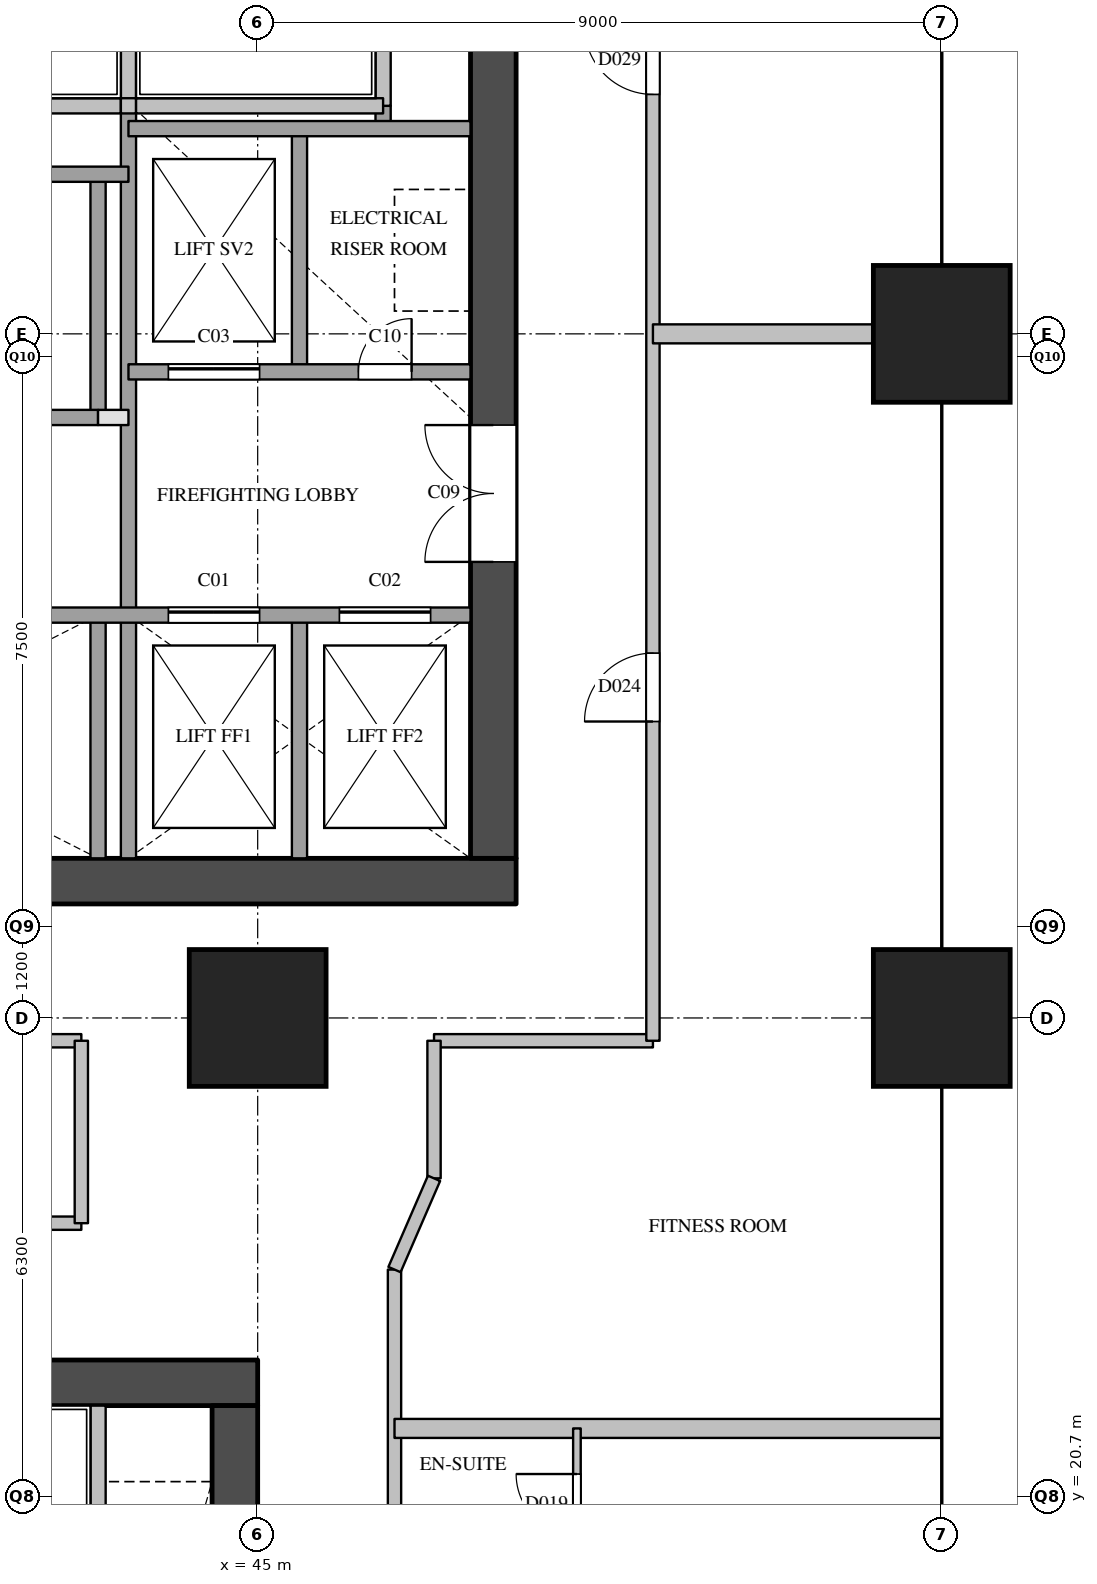
"""IFC4 building model, lengths in metres.
Left out: names, types, materials, properties, quantities, classifications, styles, units other than length and angle.
Written with IfcOpenShell. Run it as: python <this file> out.ifc"""

import sys

from ifc_helpers import new_model, si_unit, direction, frame, frame_2d, origin, origin_2d, place, context, subcontext, project, spatial, rectangle, extrude, element, fill, save


model = new_model("IFC4")
c1 = context("Model", 3, precision=1e-05, world=origin(), true_north=direction((0.0, 1.0)))
c2 = subcontext(c1, "Body", "Model", "MODEL_VIEW")
j1 = project(units=[si_unit("LENGTHUNIT", "METRE"), si_unit("PLANEANGLEUNIT", "RADIAN")], contexts=[c1])
p1 = place(None, origin())
s1 = spatial("IfcSite", under=j1, at=p1, CompositionType="ELEMENT")
p2 = place(p1, origin())
s2 = spatial("IfcBuilding", under=s1, at=p2, CompositionType="ELEMENT")
p3 = place(p2, frame((0.0, 0.0, 112.0)))
s3 = spatial("IfcBuildingStorey", under=s2, at=p3, CompositionType="ELEMENT", Elevation=112.0)
for number, where, z_axis, x_axis in (
    (1, (45.0, 27.0, 0.0), (0.0, 0.0, 1.0), (1.0, 0.0, 0.0)),
    (2, (54.0, 27.0, 0.0), (0.0, 0.0, 1.0), (1.0, 0.0, 0.0)),
    (3, (54.0, 36.0, 0.0), (0.0, 0.0, 1.0), (1.0, 0.0, 0.0)),
):
    element("IfcColumn", number, at=place(p3, frame(where, z_axis=z_axis, x_axis=x_axis)), inside=s3, PredefinedType="COLUMN", context=c2, shape_type="SweptSolid", body=[
        extrude(rectangle(XDim=1.8, YDim=1.8, at=origin_2d()), origin(), (0.0, 0.0, 1.0), 3.8),
    ])
p4 = place(p3, frame((36.0, 28.8, 0.0), z_axis=(0.0, 0.0, 1.0), x_axis=(1.0, 0.0, 0.0)))
e4 = element("IfcWall", 4, at=p4, inside=s3, PredefinedType="SHEAR", context=c2, shape_type="SweptSolid", body=[
    extrude(rectangle(XDim=12.4, YDim=0.6, at=frame_2d((6.2, 0.0))), origin(), (0.0, 0.0, 1.0), 3.5),
])
p5 = place(p3, frame((48.1, 29.1, 0.0), z_axis=(0.0, 0.0, 1.0), x_axis=(0.0, 1.0, 0.0)))
e5 = element("IfcWall", 5, at=p5, inside=s3, PredefinedType="SHEAR", context=c2, shape_type="SweptSolid", body=[
    extrude(rectangle(XDim=20.3, YDim=0.6, at=frame_2d((10.15, 0.0))), origin(), (0.0, 0.0, 1.0), 3.5),
])
p6 = place(p5, frame((12.5, 0.0, 0.0)))
e6 = element("IfcOpeningElement", 6, at=p6, cuts=e5, PredefinedType="OPENING", context=c2, shape_type="SweptSolid", body=[
    extrude(rectangle(XDim=0.7, YDim=2.1, at=frame_2d((0.35, 1.05))), frame((0.0, 0.31, 0.0), z_axis=(0.0, -1.0, 0.0), x_axis=(1.0, 0.0, 0.0)), (0.0, 0.0, 1.0), 0.62),
])
p7 = place(p5, frame((3.9, 0.0, 0.0)))
e7 = element("IfcOpeningElement", 7, at=p7, cuts=e5, PredefinedType="OPENING", context=c2, shape_type="SweptSolid", body=[
    extrude(rectangle(XDim=1.8, YDim=2.1, at=frame_2d((0.9, 1.05))), frame((0.0, 0.31, 0.0), z_axis=(0.0, -1.0, 0.0), x_axis=(1.0, 0.0, 0.0)), (0.0, 0.0, 1.0), 0.62),
])
p8 = place(p3, frame((42.9, 29.1, 0.0), z_axis=(0.0, 0.0, 1.0), x_axis=(0.0, 1.0, 0.0)))
e8 = element("IfcWall", 8, at=p8, inside=s3, PredefinedType="SOLIDWALL", context=c2, shape_type="SweptSolid", body=[
    extrude(rectangle(XDim=3.2, YDim=0.2, at=frame_2d((1.6, 0.0))), origin(), (0.0, 0.0, 1.0), 3.5),
])
p9 = place(p3, frame((42.9, 34.9, 0.0), z_axis=(0.0, 0.0, 1.0), x_axis=(0.0, 1.0, 0.0)))
e9 = element("IfcWall", 9, at=p9, inside=s3, PredefinedType="SOLIDWALL", context=c2, shape_type="SweptSolid", body=[
    extrude(rectangle(XDim=3.2, YDim=0.2, at=frame_2d((1.6, 0.0))), origin(), (0.0, 0.0, 1.0), 3.5),
])
p10 = place(p3, frame((43.3, 29.1, 0.0), z_axis=(0.0, 0.0, 1.0), x_axis=(0.0, 1.0, 0.0)))
e10 = element("IfcWall", 10, at=p10, inside=s3, PredefinedType="SOLIDWALL", context=c2, shape_type="SweptSolid", body=[
    extrude(rectangle(XDim=9.9, YDim=0.2, at=frame_2d((4.95, 0.0))), origin(), (0.0, 0.0, 1.0), 3.5),
])
p11 = place(p3, frame((43.3, 39.0, 0.0), z_axis=(0.0, 0.0, 1.0), x_axis=(0.0, 1.0, 0.0)))
e11 = element("IfcWall", 11, at=p11, inside=s3, PredefinedType="SOLIDWALL", context=c2, shape_type="SweptSolid", body=[
    extrude(rectangle(XDim=1.78, YDim=0.2, at=frame_2d((0.89, 0.0))), origin(), (0.0, 0.0, 1.0), 3.5),
])
for number, where, z_axis, x_axis in (
    (12, (45.55, 29.1, 0.0), (0.0, 0.0, 1.0), (0.0, 1.0, 0.0)),
    (13, (45.55, 35.5, 0.0), (0.0, 0.0, 1.0), (0.0, 1.0, 0.0)),
):
    element("IfcWall", number, at=place(p3, frame(where, z_axis=z_axis, x_axis=x_axis)), inside=s3, PredefinedType="SOLIDWALL", context=c2, shape_type="SweptSolid", body=[
        extrude(rectangle(XDim=3.2, YDim=0.2, at=frame_2d((1.6, 0.0))), origin(), (0.0, 0.0, 1.0), 3.5),
    ])
p12 = place(p3, frame((46.65, 38.7, 0.0), z_axis=(0.0, 0.0, 1.0), x_axis=(0.0, 1.0, 0.0)))
e14 = element("IfcWall", 14, at=p12, inside=s3, PredefinedType="SOLIDWALL", context=c2, shape_type="SweptSolid", body=[
    extrude(rectangle(XDim=0.3, YDim=0.2, at=frame_2d((0.15, 0.0))), origin(), (0.0, 0.0, 1.0), 3.5),
])
p13 = place(p3, frame((46.65, 39.0, 0.0), z_axis=(0.0, 0.0, 1.0), x_axis=(0.0, 1.0, 0.0)))
e15 = element("IfcWall", 15, at=p13, inside=s3, PredefinedType="SOLIDWALL", context=c2, shape_type="SweptSolid", body=[
    extrude(rectangle(XDim=1.78, YDim=0.2, at=frame_2d((0.89, 0.0))), origin(), (0.0, 0.0, 1.0), 3.5),
])
p14 = place(p3, frame((36.6, 32.3, 0.0), z_axis=(0.0, 0.0, 1.0), x_axis=(1.0, 0.0, 0.0)))
e16 = element("IfcWall", 16, at=p14, inside=s3, PredefinedType="SOLIDWALL", context=c2, shape_type="SweptSolid", body=[
    extrude(rectangle(XDim=11.2, YDim=0.2, at=frame_2d((5.6, 0.0))), origin(), (0.0, 0.0, 1.0), 3.5),
])
p15 = place(p14, frame((7.225, 0.0, 0.0)))
e17 = element("IfcOpeningElement", 17, at=p15, cuts=e16, PredefinedType="OPENING", context=c2, shape_type="SweptSolid", body=[
    extrude(rectangle(XDim=1.2, YDim=2.1, at=frame_2d((0.6, 1.05))), frame((0.0, 0.11, 0.0), z_axis=(0.0, -1.0, 0.0), x_axis=(1.0, 0.0, 0.0)), (0.0, 0.0, 1.0), 0.22),
])
p16 = place(p14, frame((9.475, 0.0, 0.0)))
e18 = element("IfcOpeningElement", 18, at=p16, cuts=e16, PredefinedType="OPENING", context=c2, shape_type="SweptSolid", body=[
    extrude(rectangle(XDim=1.2, YDim=2.1, at=frame_2d((0.6, 1.05))), frame((0.0, 0.11, 0.0), z_axis=(0.0, -1.0, 0.0), x_axis=(1.0, 0.0, 0.0)), (0.0, 0.0, 1.0), 0.22),
])
p17 = place(p3, frame((42.9, 34.9, 0.0), z_axis=(0.0, 0.0, 1.0), x_axis=(1.0, 0.0, 0.0)))
e19 = element("IfcWall", 19, at=p17, inside=s3, PredefinedType="PARTITIONING", context=c2, shape_type="SweptSolid", body=[
    extrude(rectangle(XDim=0.4, YDim=0.2, at=frame_2d((0.2, 0.0))), origin(), (0.0, 0.0, 1.0), 3.5),
])
p18 = place(p3, frame((36.6, 34.9, 0.0), z_axis=(0.0, 0.0, 1.0), x_axis=(1.0, 0.0, 0.0)))
e20 = element("IfcWall", 20, at=p18, inside=s3, PredefinedType="SOLIDWALL", context=c2, shape_type="SweptSolid", body=[
    extrude(rectangle(XDim=6.3, YDim=0.2, at=frame_2d((3.15, 0.0))), origin(), (0.0, 0.0, 1.0), 3.5),
])
p19 = place(p3, frame((43.3, 35.5, 0.0), z_axis=(0.0, 0.0, 1.0), x_axis=(1.0, 0.0, 0.0)))
e21 = element("IfcWall", 21, at=p19, inside=s3, PredefinedType="SOLIDWALL", context=c2, shape_type="SweptSolid", body=[
    extrude(rectangle(XDim=4.5, YDim=0.2, at=frame_2d((2.25, 0.0))), origin(), (0.0, 0.0, 1.0), 3.5),
])
p20 = place(p19, frame((0.525, 0.0, 0.0)))
e22 = element("IfcOpeningElement", 22, at=p20, cuts=e21, PredefinedType="OPENING", context=c2, shape_type="SweptSolid", body=[
    extrude(rectangle(XDim=1.2, YDim=2.1, at=frame_2d((0.6, 1.05))), frame((0.0, 0.11, 0.0), z_axis=(0.0, -1.0, 0.0), x_axis=(1.0, 0.0, 0.0)), (0.0, 0.0, 1.0), 0.22),
])
p21 = place(p19, frame((3.025, 0.0, 0.0)))
e23 = element("IfcOpeningElement", 23, at=p21, cuts=e21, PredefinedType="OPENING", context=c2, shape_type="SweptSolid", body=[
    extrude(rectangle(XDim=0.7, YDim=2.1, at=frame_2d((0.35, 1.05))), frame((0.0, 0.11, 0.0), z_axis=(0.0, -1.0, 0.0), x_axis=(1.0, 0.0, 0.0)), (0.0, 0.0, 1.0), 0.22),
])
p22 = place(p3, frame((36.6, 38.1, 0.0), z_axis=(0.0, 0.0, 1.0), x_axis=(1.0, 0.0, 0.0)))
e24 = element("IfcWall", 24, at=p22, inside=s3, PredefinedType="SOLIDWALL", context=c2, shape_type="SweptSolid", body=[
    extrude(rectangle(XDim=6.7, YDim=0.2, at=frame_2d((3.35, 0.0))), origin(), (0.0, 0.0, 1.0), 3.5),
])
p23 = place(p3, frame((43.3, 38.7, 0.0), z_axis=(0.0, 0.0, 1.0), x_axis=(1.0, 0.0, 0.0)))
e25 = element("IfcWall", 25, at=p23, inside=s3, PredefinedType="SOLIDWALL", context=c2, shape_type="SweptSolid", body=[
    extrude(rectangle(XDim=4.5, YDim=0.2, at=frame_2d((2.25, 0.0))), origin(), (0.0, 0.0, 1.0), 3.5),
])
p24 = place(p3, frame((40.05, 39.0, 0.0), z_axis=(0.0, 0.0, 1.0), x_axis=(1.0, 0.0, 0.0)))
e26 = element("IfcWall", 26, at=p24, inside=s3, PredefinedType="SOLIDWALL", context=c2, shape_type="SweptSolid", body=[
    extrude(rectangle(XDim=3.15, YDim=0.2, at=frame_2d((1.575, 0.0))), origin(), (0.0, 0.0, 1.0), 3.5),
])
p25 = place(p3, frame((43.2, 39.0, 0.0), z_axis=(0.0, 0.0, 1.0), x_axis=(1.0, 0.0, 0.0)))
e27 = element("IfcWall", 27, at=p25, inside=s3, PredefinedType="SOLIDWALL", context=c2, shape_type="SweptSolid", body=[
    extrude(rectangle(XDim=0.2, YDim=0.2, at=frame_2d((0.1, 0.0))), origin(), (0.0, 0.0, 1.0), 3.5),
])
p26 = place(p3, frame((43.4, 39.0, 0.0), z_axis=(0.0, 0.0, 1.0), x_axis=(1.0, 0.0, 0.0)))
e28 = element("IfcWall", 28, at=p26, inside=s3, PredefinedType="SOLIDWALL", context=c2, shape_type="SweptSolid", body=[
    extrude(rectangle(XDim=3.25, YDim=0.2, at=frame_2d((1.625, 0.0))), origin(), (0.0, 0.0, 1.0), 3.5),
])
p27 = place(p3, frame((36.0, 22.2, 0.0), z_axis=(0.0, 0.0, 1.0), x_axis=(1.0, 0.0, 0.0)))
e29 = element("IfcWall", 29, at=p27, inside=s3, PredefinedType="SHEAR", context=c2, shape_type="SweptSolid", body=[
    extrude(rectangle(XDim=9.0, YDim=0.6, at=frame_2d((4.5, 0.0))), origin(), (0.0, 0.0, 1.0), 3.5),
])
p28 = place(p3, frame((44.7, 9.6, 0.0), z_axis=(0.0, 0.0, 1.0), x_axis=(0.0, 1.0, 0.0)))
e30 = element("IfcWall", 30, at=p28, inside=s3, PredefinedType="SHEAR", context=c2, shape_type="SweptSolid", body=[
    extrude(rectangle(XDim=12.3, YDim=0.6, at=frame_2d((6.15, 0.0))), origin(), (0.0, 0.0, 1.0), 3.5),
])
p29 = place(p28, frame((0.8, 0.0, 0.0)))
e31 = element("IfcOpeningElement", 31, at=p29, cuts=e30, PredefinedType="OPENING", context=c2, shape_type="SweptSolid", body=[
    extrude(rectangle(XDim=0.7, YDim=2.1, at=frame_2d((0.35, 1.05))), frame((0.0, 0.31, 0.0), z_axis=(0.0, -1.0, 0.0), x_axis=(1.0, 0.0, 0.0)), (0.0, 0.0, 1.0), 0.62),
])
p30 = place(p3, frame((42.9, 20.0, 0.0), z_axis=(0.0, 0.0, 1.0), x_axis=(0.0, 1.0, 0.0)))
e32 = element("IfcWall", 32, at=p30, inside=s3, PredefinedType="SOLIDWALL", context=c2, shape_type="SweptSolid", body=[
    extrude(rectangle(XDim=1.9, YDim=0.2, at=frame_2d((0.95, 0.0))), origin(), (0.0, 0.0, 1.0), 3.5),
])
p31 = place(p3, frame((38.32, 24.3, 0.0), z_axis=(0.0, 0.0, 1.0), x_axis=(1.0, 0.0, 0.0)))
e33 = element("IfcWall", 33, at=p31, inside=s3, PredefinedType="PARTITIONING", context=c2, shape_type="SweptSolid", body=[
    extrude(rectangle(XDim=4.36, YDim=0.175, at=frame_2d((2.18, 0.0))), origin(), (0.0, 0.0, 1.0), 3.5),
])
p32 = place(p31, frame((1.73, 0.0, 0.0)))
e34 = element("IfcOpeningElement", 34, at=p32, cuts=e33, PredefinedType="OPENING", context=c2, shape_type="SweptSolid", body=[
    extrude(rectangle(XDim=0.9, YDim=2.1, at=frame_2d((0.45, 1.05))), frame((0.0, 0.097, 0.0), z_axis=(0.0, -1.0, 0.0), x_axis=(1.0, 0.0, 0.0)), (0.0, 0.0, 1.0), 0.195),
])
p33 = place(p3, frame((38.32, 26.7, 0.0), z_axis=(0.0, 0.0, 1.0), x_axis=(1.0, 0.0, 0.0)))
e35 = element("IfcWall", 35, at=p33, inside=s3, PredefinedType="PARTITIONING", context=c2, shape_type="SweptSolid", body=[
    extrude(rectangle(XDim=4.36, YDim=0.175, at=frame_2d((2.18, 0.0))), origin(), (0.0, 0.0, 1.0), 2.5),
])
p34 = place(p3, frame((47.32, 26.7, 0.0), z_axis=(0.0, 0.0, 1.0), x_axis=(1.0, 0.0, 0.0)))
e36 = element("IfcWall", 36, at=p34, inside=s3, PredefinedType="PARTITIONING", context=c2, shape_type="SweptSolid", body=[
    extrude(rectangle(XDim=2.88, YDim=0.175, at=frame_2d((1.44, 0.0))), origin(), (0.0, 0.0, 1.0), 2.5),
])
p35 = place(p3, frame((42.68, 24.3, 0.0), z_axis=(0.0, 0.0, 1.0), x_axis=(0.0, 1.0, 0.0)))
e37 = element("IfcWall", 37, at=p35, inside=s3, PredefinedType="PARTITIONING", context=c2, shape_type="SweptSolid", body=[
    extrude(rectangle(XDim=2.4, YDim=0.175, at=frame_2d((1.2, 0.0))), origin(), (0.0, 0.0, 1.0), 2.5),
])
p36 = place(p3, frame((46.8, 7.2, 0.0), z_axis=(0.0, 0.0, 1.0), x_axis=(0.0, 1.0, 0.0)))
e38 = element("IfcWall", 38, at=p36, inside=s3, PredefinedType="PARTITIONING", context=c2, shape_type="SweptSolid", body=[
    extrude(rectangle(XDim=16.49, YDim=0.175, at=frame_2d((8.245, 0.0))), origin(), (0.0, 0.0, 1.0), 3.5),
])
p37 = place(p36, frame((0.3, 0.0, 0.0)))
e39 = element("IfcOpeningElement", 39, at=p37, cuts=e38, PredefinedType="OPENING", context=c2, shape_type="SweptSolid", body=[
    extrude(rectangle(XDim=1.0, YDim=2.1, at=frame_2d((0.5, 1.05))), frame((0.0, 0.097, 0.0), z_axis=(0.0, -1.0, 0.0), x_axis=(1.0, 0.0, 0.0)), (0.0, 0.0, 1.0), 0.195),
])
p38 = place(p36, frame((5.5, 0.0, 0.0)))
e40 = element("IfcOpeningElement", 40, at=p38, cuts=e38, PredefinedType="OPENING", context=c2, shape_type="SweptSolid", body=[
    extrude(rectangle(XDim=1.0, YDim=2.1, at=frame_2d((0.5, 1.05))), frame((0.0, 0.097, 0.0), z_axis=(0.0, -1.0, 0.0), x_axis=(1.0, 0.0, 0.0)), (0.0, 0.0, 1.0), 0.195),
])
p39 = place(p36, frame((11.1, 0.0, 0.0)))
e41 = element("IfcOpeningElement", 41, at=p39, cuts=e38, PredefinedType="OPENING", context=c2, shape_type="SweptSolid", body=[
    extrude(rectangle(XDim=1.0, YDim=2.1, at=frame_2d((0.5, 1.05))), frame((0.0, 0.097, 0.0), z_axis=(0.0, -1.0, 0.0), x_axis=(1.0, 0.0, 0.0)), (0.0, 0.0, 1.0), 0.195),
])
p40 = place(p3, frame((47.32, 24.89, 0.0), z_axis=(0.0, 0.0, 1.0), x_axis=(0.0, 1.0, 0.0)))
e42 = element("IfcWall", 42, at=p40, inside=s3, PredefinedType="PARTITIONING", context=c2, shape_type="SweptSolid", body=[
    extrude(rectangle(XDim=1.81, YDim=0.175, at=frame_2d((0.905, 0.0))), origin(), (0.0, 0.0, 1.0), 2.5),
])
p41 = place(p3, frame((50.2, 26.7, 0.0), z_axis=(0.0, 0.0, 1.0), x_axis=(0.0, 1.0, 0.0)))
e43 = element("IfcWall", 43, at=p41, inside=s3, PredefinedType="PARTITIONING", context=c2, shape_type="SweptSolid", body=[
    extrude(rectangle(XDim=25.1, YDim=0.175, at=frame_2d((12.55, 0.0))), origin(), (0.0, 0.0, 1.0), 2.5),
])
p42 = place(p41, frame((4.2, 0.0, 0.0)))
e44 = element("IfcOpeningElement", 44, at=p42, cuts=e43, PredefinedType="OPENING", context=c2, shape_type="SweptSolid", body=[
    extrude(rectangle(XDim=0.9, YDim=2.1, at=frame_2d((0.45, 1.05))), frame((0.0, 0.097, 0.0), z_axis=(0.0, -1.0, 0.0), x_axis=(1.0, 0.0, 0.0)), (0.0, 0.0, 1.0), 0.195),
])
p43 = place(p41, frame((12.45, 0.0, 0.0)))
e45 = element("IfcOpeningElement", 45, at=p43, cuts=e43, PredefinedType="OPENING", context=c2, shape_type="SweptSolid", body=[
    extrude(rectangle(XDim=0.9, YDim=2.1, at=frame_2d((0.45, 1.05))), frame((0.0, 0.097, 0.0), z_axis=(0.0, -1.0, 0.0), x_axis=(1.0, 0.0, 0.0)), (0.0, 0.0, 1.0), 0.195),
])
p44 = place(p41, frame((20.35, 0.0, 0.0)))
e46 = element("IfcOpeningElement", 46, at=p44, cuts=e43, PredefinedType="OPENING", context=c2, shape_type="SweptSolid", body=[
    extrude(rectangle(XDim=0.9, YDim=2.1, at=frame_2d((0.45, 1.05))), frame((0.0, 0.097, 0.0), z_axis=(0.0, -1.0, 0.0), x_axis=(1.0, 0.0, 0.0)), (0.0, 0.0, 1.0), 0.195),
])
p45 = place(p3, frame((46.8, 21.6, 0.0), z_axis=(0.0, 0.0, 1.0), x_axis=(1.0, 0.0, 0.0)))
e47 = element("IfcWall", 47, at=p45, inside=s3, PredefinedType="PARTITIONING", context=c2, shape_type="SweptSolid", body=[
    extrude(rectangle(XDim=7.2, YDim=0.25, at=frame_2d((3.6, 0.0))), origin(), (0.0, 0.0, 1.0), 2.5),
])
p46 = place(p3, frame((50.2, 36.0, 0.0), z_axis=(0.0, 0.0, 1.0), x_axis=(1.0, 0.0, 0.0)))
e48 = element("IfcWall", 48, at=p46, inside=s3, PredefinedType="PARTITIONING", context=c2, shape_type="SweptSolid", body=[
    extrude(rectangle(XDim=3.8, YDim=0.25, at=frame_2d((1.9, 0.0))), origin(), (0.0, 0.0, 1.0), 3.5),
])
p47 = place(p3, frame((49.2, 19.6, 0.0), z_axis=(0.0, 0.0, 1.0), x_axis=(0.0, 1.0, 0.0)))
e49 = element("IfcWall", 49, at=p47, inside=s3, PredefinedType="PARTITIONING", context=c2, shape_type="SweptSolid", body=[
    extrude(rectangle(XDim=2.0, YDim=0.1, at=frame_2d((1.0, 0.0))), origin(), (0.0, 0.0, 1.0), 3.5),
])
p48 = place(p47, frame((0.6, 0.0, 0.0)))
e50 = element("IfcOpeningElement", 50, at=p48, cuts=e49, PredefinedType="OPENING", context=c2, shape_type="SweptSolid", body=[
    extrude(rectangle(XDim=0.8, YDim=2.1, at=frame_2d((0.4, 1.05))), frame((0.0, 0.06, 0.0), z_axis=(0.0, -1.0, 0.0), x_axis=(1.0, 0.0, 0.0)), (0.0, 0.0, 1.0), 0.12),
])
p49 = place(p3, frame((47.32, 24.89, 0.0), z_axis=(0.0, 0.0, 1.0), x_axis=(-0.397633632391, -0.917544273804, 0.0)))
e51 = element("IfcWall", 51, at=p49, inside=s3, PredefinedType="PARTITIONING", context=c2, shape_type="SweptSolid", body=[
    extrude(rectangle(XDim=1.308, YDim=0.175, at=frame_2d((0.654, 0.0))), origin(), (0.0, 0.0, 1.0), 3.5),
])
p50 = place(p15, origin())
e52 = element("IfcDoor", 52, at=p50, inside=s3, OperationType="SLIDING_TO_LEFT", PredefinedType="DOOR", context=c2, shape_type="SweptSolid", body=[
    extrude(rectangle(XDim=1.2, YDim=2.1, at=frame_2d((0.6, 1.05))), frame((0.0, 0.025, 0.0), z_axis=(0.0, -1.0, 0.0), x_axis=(1.0, 0.0, 0.0)), (0.0, 0.0, 1.0), 0.05),
])
fill(e17, e52)
p51 = place(p16, origin())
e53 = element("IfcDoor", 53, at=p51, inside=s3, OperationType="SLIDING_TO_LEFT", PredefinedType="DOOR", context=c2, shape_type="SweptSolid", body=[
    extrude(rectangle(XDim=1.2, YDim=2.1, at=frame_2d((0.6, 1.05))), frame((0.0, 0.025, 0.0), z_axis=(0.0, -1.0, 0.0), x_axis=(1.0, 0.0, 0.0)), (0.0, 0.0, 1.0), 0.05),
])
fill(e18, e53)
p52 = place(p20, origin())
e54 = element("IfcDoor", 54, at=p52, inside=s3, OperationType="SLIDING_TO_LEFT", PredefinedType="DOOR", context=c2, shape_type="SweptSolid", body=[
    extrude(rectangle(XDim=1.2, YDim=2.1, at=frame_2d((0.6, 1.05))), frame((0.0, 0.025, 0.0), z_axis=(0.0, -1.0, 0.0), x_axis=(1.0, 0.0, 0.0)), (0.0, 0.0, 1.0), 0.05),
])
fill(e22, e54)
p53 = place(p7, origin())
e55 = element("IfcDoor", 55, at=p53, inside=s3, OperationType="DOUBLE_DOOR_SINGLE_SWING", PredefinedType="DOOR", context=c2, shape_type="SweptSolid", body=[
    extrude(rectangle(XDim=1.8, YDim=2.1, at=frame_2d((0.9, 1.05))), frame((0.0, 0.025, 0.0), z_axis=(0.0, -1.0, 0.0), x_axis=(1.0, 0.0, 0.0)), (0.0, 0.0, 1.0), 0.05),
])
fill(e7, e55)
p54 = place(p21, origin())
e56 = element("IfcDoor", 56, at=p54, inside=s3, OperationType="SINGLE_SWING_RIGHT", PredefinedType="DOOR", context=c2, shape_type="SweptSolid", body=[
    extrude(rectangle(XDim=0.7, YDim=2.1, at=frame_2d((0.35, 1.05))), frame((0.0, 0.025, 0.0), z_axis=(0.0, -1.0, 0.0), x_axis=(1.0, 0.0, 0.0)), (0.0, 0.0, 1.0), 0.05),
])
fill(e23, e56)
p55 = place(p48, origin())
e57 = element("IfcDoor", 57, at=p55, inside=s3, OperationType="SINGLE_SWING_RIGHT", PredefinedType="DOOR", context=c2, shape_type="SweptSolid", body=[
    extrude(rectangle(XDim=0.8, YDim=2.1, at=frame_2d((0.4, 1.05))), frame((0.0, 0.025, 0.0), z_axis=(0.0, -1.0, 0.0), x_axis=(1.0, 0.0, 0.0)), (0.0, 0.0, 1.0), 0.05),
])
fill(e50, e57)
p56 = place(p42, origin())
e58 = element("IfcDoor", 58, at=p56, inside=s3, OperationType="SINGLE_SWING_LEFT", PredefinedType="DOOR", context=c2, shape_type="SweptSolid", body=[
    extrude(rectangle(XDim=0.9, YDim=2.1, at=frame_2d((0.45, 1.05))), frame((0.0, 0.025, 0.0), z_axis=(0.0, -1.0, 0.0), x_axis=(1.0, 0.0, 0.0)), (0.0, 0.0, 1.0), 0.05),
])
fill(e44, e58)
p57 = place(p43, origin())
e59 = element("IfcDoor", 59, at=p57, inside=s3, OperationType="SINGLE_SWING_RIGHT", PredefinedType="DOOR", context=c2, shape_type="SweptSolid", body=[
    extrude(rectangle(XDim=0.9, YDim=2.1, at=frame_2d((0.45, 1.05))), frame((0.0, 0.025, 0.0), z_axis=(0.0, -1.0, 0.0), x_axis=(1.0, 0.0, 0.0)), (0.0, 0.0, 1.0), 0.05),
])
fill(e45, e59)
save(model, sys.argv[1])
